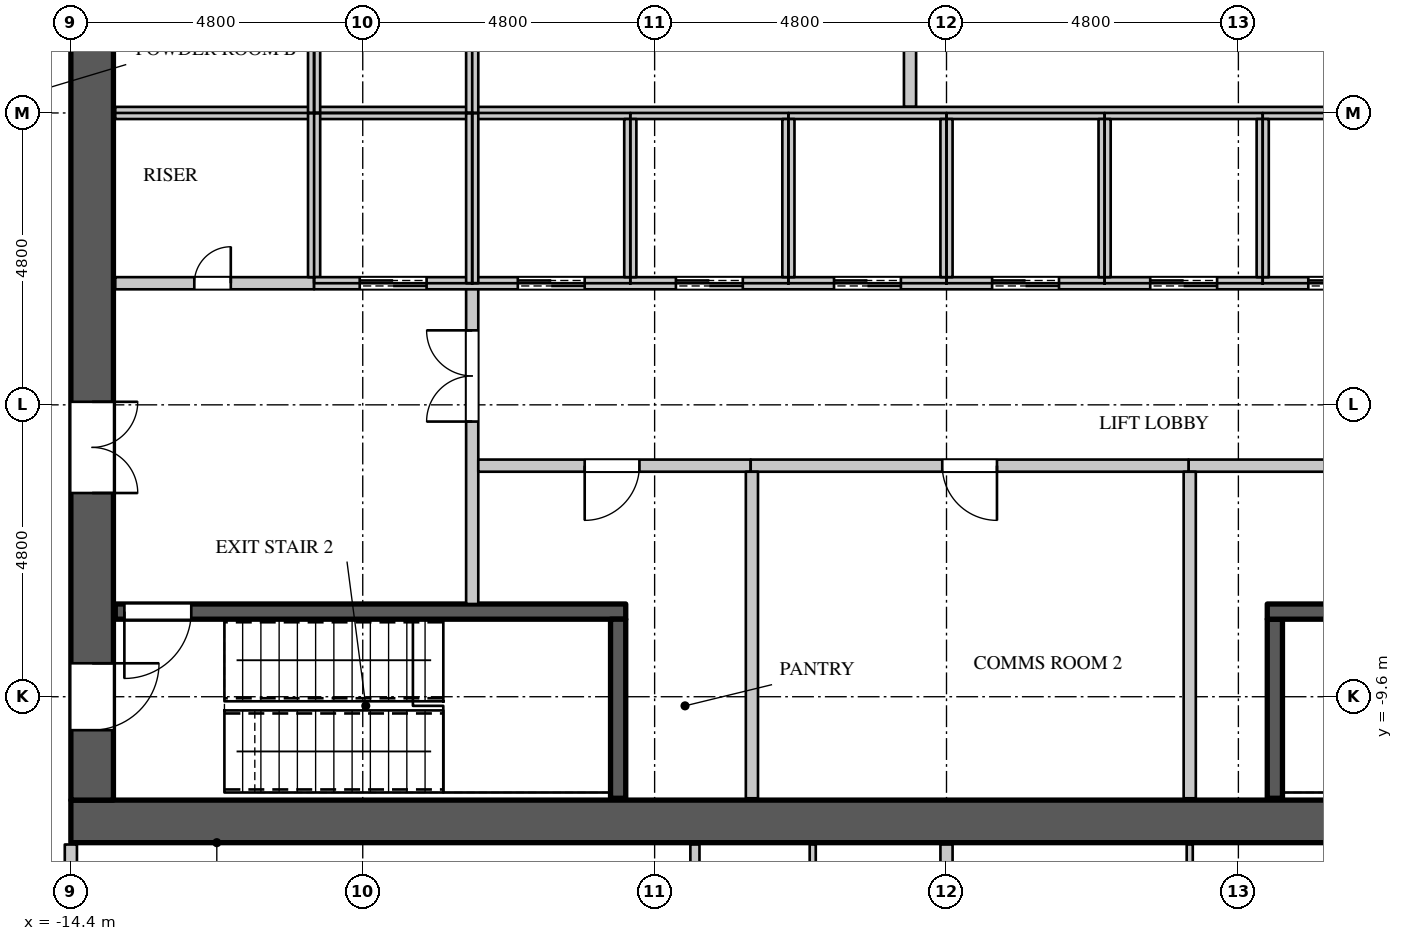
"""IFC4 building model, lengths in metres.
Left out: names, types, materials, properties, quantities, classifications, styles, units other than length and angle.
Written with IfcOpenShell. Run it as: python <this file> out.ifc"""

import sys

from ifc_helpers import new_model, si_unit, direction, frame, frame_2d, origin, place, context, subcontext, project, spatial, rectangle, extrude, element, fill, save


model = new_model("IFC4")
c1 = context("Model", 3, precision=1e-05, world=origin(), true_north=direction((0.0, 1.0)))
c2 = subcontext(c1, "Body", "Model", "MODEL_VIEW")
j1 = project(units=[si_unit("LENGTHUNIT", "METRE"), si_unit("PLANEANGLEUNIT", "RADIAN")], contexts=[c1])
p1 = place(None, origin())
s1 = spatial("IfcSite", under=j1, at=p1, CompositionType="ELEMENT")
p2 = place(p1, origin())
s2 = spatial("IfcBuilding", under=s1, at=p2, CompositionType="ELEMENT")
p3 = place(p2, frame((0.0, 0.0, 204.3)))
s3 = spatial("IfcBuildingStorey", under=s2, at=p3, CompositionType="ELEMENT", Elevation=204.3)
p4 = place(p3, frame((-14.4, -11.65, 0.0), z_axis=(0.0, 0.0, 1.0), x_axis=(1.0, 0.0, 0.0)))
e1 = element("IfcWall", 1, at=p4, inside=s3, PredefinedType="SHEAR", context=c2, shape_type="SweptSolid", body=[
    extrude(rectangle(XDim=28.8, YDim=0.7, at=frame_2d((14.4, 0.0))), origin(), (0.0, 0.0, 1.0), 4.2),
])
p5 = place(p3, frame((-14.05, -11.3, 0.0), z_axis=(0.0, 0.0, 1.0), x_axis=(0.0, 1.0, 0.0)))
e2 = element("IfcWall", 2, at=p5, inside=s3, PredefinedType="SHEAR", context=c2, shape_type="SweptSolid", body=[
    extrude(rectangle(XDim=22.6, YDim=0.7, at=frame_2d((11.3, 0.0))), origin(), (0.0, 0.0, 1.0), 4.2),
])
p6 = place(p5, frame((20.35, 0.0, 0.0)))
e3 = element("IfcOpeningElement", 3, at=p6, cuts=e2, PredefinedType="OPENING", context=c2, shape_type="SweptSolid", body=[
    extrude(rectangle(XDim=1.1, YDim=2.2, at=frame_2d((0.55, 1.1))), frame((0.0, 0.36, 0.0), z_axis=(0.0, -1.0, 0.0), x_axis=(1.0, 0.0, 0.0)), (0.0, 0.0, 1.0), 0.72),
])
p7 = place(p5, frame((1.15, 0.0, 0.0)))
e4 = element("IfcOpeningElement", 4, at=p7, cuts=e2, PredefinedType="OPENING", context=c2, shape_type="SweptSolid", body=[
    extrude(rectangle(XDim=1.1, YDim=2.2, at=frame_2d((0.55, 1.1))), frame((0.0, 0.36, 0.0), z_axis=(0.0, -1.0, 0.0), x_axis=(1.0, 0.0, 0.0)), (0.0, 0.0, 1.0), 0.72),
])
p8 = place(p5, frame((16.05, 0.0, 0.0)))
e5 = element("IfcOpeningElement", 5, at=p8, cuts=e2, PredefinedType="OPENING", context=c2, shape_type="SweptSolid", body=[
    extrude(rectangle(XDim=1.5, YDim=2.4, at=frame_2d((0.75, 1.2))), frame((0.0, 0.36, 0.0), z_axis=(0.0, -1.0, 0.0), x_axis=(1.0, 0.0, 0.0)), (0.0, 0.0, 1.0), 0.72),
])
p9 = place(p5, frame((5.05, 0.0, 0.0)))
e6 = element("IfcOpeningElement", 6, at=p9, cuts=e2, PredefinedType="OPENING", context=c2, shape_type="SweptSolid", body=[
    extrude(rectangle(XDim=1.5, YDim=2.4, at=frame_2d((0.75, 1.2))), frame((0.0, 0.36, 0.0), z_axis=(0.0, -1.0, 0.0), x_axis=(1.0, 0.0, 0.0)), (0.0, 0.0, 1.0), 0.72),
])
p10 = place(p3, frame((-14.4, -14.3, 0.0), z_axis=(0.0, 0.0, 1.0), x_axis=(0.0, 1.0, 0.0)))
e7 = element("IfcWall", 7, at=p10, inside=s3, PredefinedType="PARTITIONING", context=c2, shape_type="SweptSolid", body=[
    extrude(rectangle(XDim=2.27, YDim=0.2, at=frame_2d((1.135, 0.0))), origin(), (0.0, 0.0, 1.0), 3.798),
])
p11 = place(p3, frame((-7.8, -8.075, 0.0), z_axis=(0.0, 0.0, 1.0), x_axis=(0.0, 1.0, 0.0)))
e8 = element("IfcWall", 8, at=p11, inside=s3, PredefinedType="PARTITIONING", context=c2, shape_type="SweptSolid", body=[
    extrude(rectangle(XDim=5.275, YDim=0.2, at=frame_2d((2.637, 0.0))), origin(), (0.0, 0.0, 1.0), 3.798),
])
p12 = place(p11, frame((3.0, 0.0, 0.0)))
e9 = element("IfcOpeningElement", 9, at=p12, cuts=e8, PredefinedType="OPENING", context=c2, shape_type="SweptSolid", body=[
    extrude(rectangle(XDim=1.5, YDim=2.4, at=frame_2d((0.75, 1.2))), frame((0.0, 0.11, 0.0), z_axis=(0.0, -1.0, 0.0), x_axis=(1.0, 0.0, 0.0)), (0.0, 0.0, 1.0), 0.22),
])
p13 = place(p3, frame((-7.7, -5.8, 0.0), z_axis=(0.0, 0.0, 1.0), x_axis=(1.0, 0.0, 0.0)))
e10 = element("IfcWall", 10, at=p13, inside=s3, PredefinedType="PARTITIONING", context=c2, shape_type="SweptSolid", body=[
    extrude(rectangle(XDim=4.48, YDim=0.2, at=frame_2d((2.24, 0.0))), origin(), (0.0, 0.0, 1.0), 3.798),
])
p14 = place(p13, frame((1.75, 0.0, 0.0)))
e11 = element("IfcOpeningElement", 11, at=p14, cuts=e10, PredefinedType="OPENING", context=c2, shape_type="SweptSolid", body=[
    extrude(rectangle(XDim=0.9, YDim=2.2, at=frame_2d((0.45, 1.1))), frame((0.0, 0.11, 0.0), z_axis=(0.0, -1.0, 0.0), x_axis=(1.0, 0.0, 0.0)), (0.0, 0.0, 1.0), 0.22),
])
p15 = place(p3, frame((3.98, -5.8, 0.0), z_axis=(0.0, 0.0, 1.0), x_axis=(1.0, 0.0, 0.0)))
e12 = element("IfcWall", 12, at=p15, inside=s3, PredefinedType="PARTITIONING", context=c2, shape_type="SweptSolid", body=[
    extrude(rectangle(XDim=9.69, YDim=0.2, at=frame_2d((4.845, 0.0))), origin(), (0.0, 0.0, 1.0), 3.798),
])
p16 = place(p15, frame((4.4, 0.0, 0.0)))
e13 = element("IfcOpeningElement", 13, at=p16, cuts=e12, PredefinedType="OPENING", context=c2, shape_type="SweptSolid", body=[
    extrude(rectangle(XDim=0.9, YDim=2.2, at=frame_2d((0.45, 1.1))), frame((0.0, 0.11, 0.0), z_axis=(0.0, -1.0, 0.0), x_axis=(1.0, 0.0, 0.0)), (0.0, 0.0, 1.0), 0.22),
])
p17 = place(p3, frame((-4.137, -23.4, 0.0), z_axis=(0.0, 0.0, 1.0), x_axis=(0.0, 1.0, 0.0)))
e14 = element("IfcWall", 14, at=p17, inside=s3, PredefinedType="PARTITIONING", context=c2, shape_type="SweptSolid", body=[
    extrude(rectangle(XDim=11.37, YDim=0.15, at=frame_2d((5.685, 0.0))), origin(), (0.0, 0.0, 1.0), 3.2),
])
p18 = place(p17, frame((3.05, 0.0, 0.0)))
e15 = element("IfcOpeningElement", 15, at=p18, cuts=e14, PredefinedType="OPENING", context=c2, shape_type="SweptSolid", body=[
    extrude(rectangle(XDim=0.95, YDim=2.2, at=frame_2d((0.475, 1.1))), frame((0.0, 0.085, 0.0), z_axis=(0.0, -1.0, 0.0), x_axis=(1.0, 0.0, 0.0)), (0.0, 0.0, 1.0), 0.17),
])
p19 = place(p3, frame((0.0, -24.055, 0.0), z_axis=(0.0, 0.0, 1.0), x_axis=(0.0, 1.0, 0.0)))
e16 = element("IfcWall", 16, at=p19, inside=s3, PredefinedType="PARTITIONING", context=c2, shape_type="SweptSolid", body=[
    extrude(rectangle(XDim=12.025, YDim=0.2, at=frame_2d((6.012, 0.0))), origin(), (0.0, 0.0, 1.0), 3.798),
])
p20 = place(p3, frame((-13.67, -2.8, 0.0), z_axis=(0.0, 0.0, 1.0), x_axis=(1.0, 0.0, 0.0)))
e17 = element("IfcWall", 17, at=p20, inside=s3, PredefinedType="PARTITIONING", context=c2, shape_type="SweptSolid", body=[
    extrude(rectangle(XDim=3.27, YDim=0.2, at=frame_2d((1.635, 0.0))), origin(), (0.0, 0.0, 1.0), 3.798),
])
p21 = place(p20, frame((1.3, 0.0, 0.0)))
e18 = element("IfcOpeningElement", 18, at=p21, cuts=e17, PredefinedType="OPENING", context=c2, shape_type="SweptSolid", body=[
    extrude(rectangle(XDim=0.6, YDim=2.0, at=frame_2d((0.3, 1.0))), frame((0.0, 0.11, 0.0), z_axis=(0.0, -1.0, 0.0), x_axis=(1.0, 0.0, 0.0)), (0.0, 0.0, 1.0), 0.22),
])
p22 = place(p3, frame((-3.22, -5.8, 0.0), z_axis=(0.0, 0.0, 1.0), x_axis=(1.0, 0.0, 0.0)))
e19 = element("IfcWall", 19, at=p22, inside=s3, PredefinedType="PARTITIONING", context=c2, shape_type="SweptSolid", body=[
    extrude(rectangle(XDim=7.2, YDim=0.2, at=frame_2d((3.6, 0.0))), origin(), (0.0, 0.0, 1.0), 3.798),
])
p23 = place(p22, frame((3.15, 0.0, 0.0)))
e20 = element("IfcOpeningElement", 20, at=p23, cuts=e19, PredefinedType="OPENING", context=c2, shape_type="SweptSolid", body=[
    extrude(rectangle(XDim=0.9, YDim=2.2, at=frame_2d((0.45, 1.1))), frame((0.0, 0.11, 0.0), z_axis=(0.0, -1.0, 0.0), x_axis=(1.0, 0.0, 0.0)), (0.0, 0.0, 1.0), 0.22),
])
p24 = place(p3, frame((-3.2, -11.27, 0.0), z_axis=(0.0, 0.0, 1.0), x_axis=(0.0, 1.0, 0.0)))
e21 = element("IfcWall", 21, at=p24, inside=s3, PredefinedType="PARTITIONING", context=c2, shape_type="SweptSolid", body=[
    extrude(rectangle(XDim=5.37, YDim=0.2, at=frame_2d((2.685, 0.0))), origin(), (0.0, 0.0, 1.0), 3.798),
])
p25 = place(p3, frame((-0.6, 0.1, 0.0), z_axis=(0.0, 0.0, 1.0), x_axis=(0.0, 1.0, 0.0)))
e22 = element("IfcWall", 22, at=p25, inside=s3, PredefinedType="PARTITIONING", context=c2, shape_type="SweptSolid", body=[
    extrude(rectangle(XDim=2.6, YDim=0.2, at=frame_2d((1.3, 0.0))), origin(), (0.0, 0.0, 1.0), 3.798),
])
p26 = place(p3, frame((4.0, -11.27, 0.0), z_axis=(0.0, 0.0, 1.0), x_axis=(0.0, 1.0, 0.0)))
e23 = element("IfcWall", 23, at=p26, inside=s3, PredefinedType="PARTITIONING", context=c2, shape_type="SweptSolid", body=[
    extrude(rectangle(XDim=5.37, YDim=0.2, at=frame_2d((2.685, 0.0))), origin(), (0.0, 0.0, 1.0), 3.798),
])
p27 = place(p3, frame((-13.67, 0.0, 0.0), z_axis=(0.0, 0.0, 1.0), x_axis=(1.0, 0.0, 0.0)))
e24 = element("IfcWall", 24, at=p27, inside=s3, PredefinedType="PARTITIONING", context=c2, shape_type="SweptSolid", body=[
    extrude(rectangle(XDim=21.47, YDim=0.2, at=frame_2d((10.735, 0.0))), origin(), (0.0, 0.0, 1.0), 3.798),
])
p28 = place(p3, frame((-10.4, -2.7, 0.0), z_axis=(0.0, 0.0, 1.0), x_axis=(0.0, 1.0, 0.0)))
e25 = element("IfcWall", 25, at=p28, inside=s3, PredefinedType="PARTITIONING", context=c2, shape_type="SweptSolid", body=[
    extrude(rectangle(XDim=2.7, YDim=0.2, at=frame_2d((1.35, 0.0))), origin(), (0.0, 0.0, 1.0), 3.798),
])
p29 = place(p3, frame((-10.4, -2.8, 0.0), z_axis=(0.0, 0.0, 1.0), x_axis=(1.0, 0.0, 0.0)))
e26 = element("IfcWall", 26, at=p29, inside=s3, PredefinedType="PARTITIONING", context=c2, shape_type="SweptSolid", body=[
    extrude(rectangle(XDim=18.2, YDim=0.2, at=frame_2d((9.1, 0.0))), origin(), (0.0, 0.0, 1.0), 3.798),
])
p30 = place(p29, frame((0.75, 0.0, 0.0)))
e27 = element("IfcOpeningElement", 27, at=p30, cuts=e26, PredefinedType="OPENING", context=c2, shape_type="SweptSolid", body=[
    extrude(rectangle(XDim=1.1, YDim=2.2, at=frame_2d((0.55, 1.1))), frame((0.0, 0.11, 0.0), z_axis=(0.0, -1.0, 0.0), x_axis=(1.0, 0.0, 0.0)), (0.0, 0.0, 1.0), 0.22),
])
p31 = place(p29, frame((3.35, 0.0, 0.0)))
e28 = element("IfcOpeningElement", 28, at=p31, cuts=e26, PredefinedType="OPENING", context=c2, shape_type="SweptSolid", body=[
    extrude(rectangle(XDim=1.1, YDim=2.2, at=frame_2d((0.55, 1.1))), frame((0.0, 0.11, 0.0), z_axis=(0.0, -1.0, 0.0), x_axis=(1.0, 0.0, 0.0)), (0.0, 0.0, 1.0), 0.22),
])
p32 = place(p29, frame((5.95, 0.0, 0.0)))
e29 = element("IfcOpeningElement", 29, at=p32, cuts=e26, PredefinedType="OPENING", context=c2, shape_type="SweptSolid", body=[
    extrude(rectangle(XDim=1.1, YDim=2.2, at=frame_2d((0.55, 1.1))), frame((0.0, 0.11, 0.0), z_axis=(0.0, -1.0, 0.0), x_axis=(1.0, 0.0, 0.0)), (0.0, 0.0, 1.0), 0.22),
])
p33 = place(p29, frame((8.55, 0.0, 0.0)))
e30 = element("IfcOpeningElement", 30, at=p33, cuts=e26, PredefinedType="OPENING", context=c2, shape_type="SweptSolid", body=[
    extrude(rectangle(XDim=1.1, YDim=2.2, at=frame_2d((0.55, 1.1))), frame((0.0, 0.11, 0.0), z_axis=(0.0, -1.0, 0.0), x_axis=(1.0, 0.0, 0.0)), (0.0, 0.0, 1.0), 0.22),
])
p34 = place(p29, frame((11.15, 0.0, 0.0)))
e31 = element("IfcOpeningElement", 31, at=p34, cuts=e26, PredefinedType="OPENING", context=c2, shape_type="SweptSolid", body=[
    extrude(rectangle(XDim=1.1, YDim=2.2, at=frame_2d((0.55, 1.1))), frame((0.0, 0.11, 0.0), z_axis=(0.0, -1.0, 0.0), x_axis=(1.0, 0.0, 0.0)), (0.0, 0.0, 1.0), 0.22),
])
p35 = place(p29, frame((13.75, 0.0, 0.0)))
e32 = element("IfcOpeningElement", 32, at=p35, cuts=e26, PredefinedType="OPENING", context=c2, shape_type="SweptSolid", body=[
    extrude(rectangle(XDim=1.1, YDim=2.2, at=frame_2d((0.55, 1.1))), frame((0.0, 0.11, 0.0), z_axis=(0.0, -1.0, 0.0), x_axis=(1.0, 0.0, 0.0)), (0.0, 0.0, 1.0), 0.22),
])
p36 = place(p29, frame((16.35, 0.0, 0.0)))
e33 = element("IfcOpeningElement", 33, at=p36, cuts=e26, PredefinedType="OPENING", context=c2, shape_type="SweptSolid", body=[
    extrude(rectangle(XDim=1.1, YDim=2.2, at=frame_2d((0.55, 1.1))), frame((0.0, 0.11, 0.0), z_axis=(0.0, -1.0, 0.0), x_axis=(1.0, 0.0, 0.0)), (0.0, 0.0, 1.0), 0.22),
])
p37 = place(p3, frame((-10.4, 0.0, 0.0), z_axis=(0.0, 0.0, 1.0), x_axis=(0.0, 1.0, 0.0)))
e34 = element("IfcWall", 34, at=p37, inside=s3, PredefinedType="PARTITIONING", context=c2, shape_type="SweptSolid", body=[
    extrude(rectangle(XDim=2.7, YDim=0.2, at=frame_2d((1.35, 0.0))), origin(), (0.0, 0.0, 1.0), 3.798),
])
for number, where, z_axis, x_axis in (
    (35, (-7.8, -2.8, 0.0), (0.0, 0.0, 1.0), (0.0, 1.0, 0.0)),
    (36, (-7.8, 0.0, 0.0), (0.0, 0.0, 1.0), (0.0, 1.0, 0.0)),
):
    element("IfcWall", number, at=place(p3, frame(where, z_axis=z_axis, x_axis=x_axis)), inside=s3, PredefinedType="PARTITIONING", context=c2, shape_type="SweptSolid", body=[
        extrude(rectangle(XDim=2.8, YDim=0.2, at=frame_2d((1.4, 0.0))), origin(), (0.0, 0.0, 1.0), 3.798),
    ])
for number, where, z_axis, x_axis in (
    (37, (-5.2, -2.7, 0.0), (0.0, 0.0, 1.0), (0.0, 1.0, 0.0)),
    (38, (-2.6, -2.7, 0.0), (0.0, 0.0, 1.0), (0.0, 1.0, 0.0)),
    (39, (0.0, -2.7, 0.0), (0.0, 0.0, 1.0), (0.0, 1.0, 0.0)),
    (40, (2.6, -2.7, 0.0), (0.0, 0.0, 1.0), (0.0, 1.0, 0.0)),
    (41, (5.2, -2.7, 0.0), (0.0, 0.0, 1.0), (0.0, 1.0, 0.0)),
):
    element("IfcWall", number, at=place(p3, frame(where, z_axis=z_axis, x_axis=x_axis)), inside=s3, PredefinedType="PARTITIONING", context=c2, shape_type="SweptSolid", body=[
        extrude(rectangle(XDim=2.6, YDim=0.2, at=frame_2d((1.3, 0.0))), origin(), (0.0, 0.0, 1.0), 3.798),
    ])
p38 = place(p3, frame((-13.67, -8.2, 0.0), z_axis=(0.0, 0.0, 1.0), x_axis=(1.0, 0.0, 0.0)))
e42 = element("IfcWall", 42, at=p38, inside=s3, PredefinedType="SHEAR", context=c2, shape_type="SweptSolid", body=[
    extrude(rectangle(XDim=8.395, YDim=0.25, at=frame_2d((4.198, 0.0))), origin(), (0.0, 0.0, 1.0), 3.798),
])
p39 = place(p38, frame((0.15, 0.0, 0.0)))
e43 = element("IfcOpeningElement", 43, at=p39, cuts=e42, PredefinedType="OPENING", context=c2, shape_type="SweptSolid", body=[
    extrude(rectangle(XDim=1.1, YDim=2.2, at=frame_2d((0.55, 1.1))), frame((0.0, 0.135, 0.0), z_axis=(0.0, -1.0, 0.0), x_axis=(1.0, 0.0, 0.0)), (0.0, 0.0, 1.0), 0.27),
])
for number, where, z_axis, x_axis in (
    (44, (-5.4, -11.27, 0.0), (0.0, 0.0, 1.0), (0.0, 1.0, 0.0)),
    (45, (5.4, -11.27, 0.0), (0.0, 0.0, 1.0), (0.0, 1.0, 0.0)),
):
    element("IfcWall", number, at=place(p3, frame(where, z_axis=z_axis, x_axis=x_axis)), inside=s3, PredefinedType="SHEAR", context=c2, shape_type="SweptSolid", body=[
        extrude(rectangle(XDim=2.945, YDim=0.25, at=frame_2d((1.473, 0.0))), origin(), (0.0, 0.0, 1.0), 3.798),
    ])
p40 = place(p3, frame((5.275, -8.2, 0.0), z_axis=(0.0, 0.0, 1.0), x_axis=(1.0, 0.0, 0.0)))
e46 = element("IfcWall", 46, at=p40, inside=s3, PredefinedType="SHEAR", context=c2, shape_type="SweptSolid", body=[
    extrude(rectangle(XDim=8.395, YDim=0.25, at=frame_2d((4.198, 0.0))), origin(), (0.0, 0.0, 1.0), 3.798),
])
p41 = place(p3, frame((-2.2, -15.925, 0.0), z_axis=(0.0, 0.0, 1.0), x_axis=(0.0, 1.0, 0.0)))
e47 = element("IfcWall", 47, at=p41, inside=s3, PredefinedType="PARTITIONING", context=c2, shape_type="SweptSolid", body=[
    extrude(rectangle(XDim=3.895, YDim=0.1, at=frame_2d((1.948, 0.0))), origin(), (0.0, 0.0, 1.0), 3.798),
])
p42 = place(p3, frame((4.0, -16.95, 0.0), z_axis=(0.0, 0.0, 1.0), x_axis=(0.0, 1.0, 0.0)))
e48 = element("IfcWall", 48, at=p42, inside=s3, PredefinedType="PARTITIONING", context=c2, shape_type="SweptSolid", body=[
    extrude(rectangle(XDim=4.92, YDim=0.1, at=frame_2d((2.46, 0.0))), origin(), (0.0, 0.0, 1.0), 3.2),
])
p43 = place(p21, origin())
e49 = element("IfcDoor", 49, at=p43, inside=s3, OperationType="SINGLE_SWING_RIGHT", PredefinedType="DOOR", context=c2, shape_type="SweptSolid", body=[
    extrude(rectangle(XDim=0.6, YDim=2.0, at=frame_2d((0.3, 1.0))), frame((0.0, 0.025, 0.0), z_axis=(0.0, -1.0, 0.0), x_axis=(1.0, 0.0, 0.0)), (0.0, 0.0, 1.0), 0.05),
])
fill(e18, e49)
p44 = place(p14, origin())
e50 = element("IfcDoor", 50, at=p44, inside=s3, OperationType="SINGLE_SWING_RIGHT", PredefinedType="DOOR", context=c2, shape_type="SweptSolid", body=[
    extrude(rectangle(XDim=0.9, YDim=2.2, at=frame_2d((0.45, 1.1))), frame((0.0, 0.025, 0.0), z_axis=(0.0, -1.0, 0.0), x_axis=(1.0, 0.0, 0.0)), (0.0, 0.0, 1.0), 0.05),
])
fill(e11, e50)
p45 = place(p23, origin())
e51 = element("IfcDoor", 51, at=p45, inside=s3, OperationType="SINGLE_SWING_LEFT", PredefinedType="DOOR", context=c2, shape_type="SweptSolid", body=[
    extrude(rectangle(XDim=0.9, YDim=2.2, at=frame_2d((0.45, 1.1))), frame((0.0, 0.025, 0.0), z_axis=(0.0, -1.0, 0.0), x_axis=(1.0, 0.0, 0.0)), (0.0, 0.0, 1.0), 0.05),
])
fill(e20, e51)
p46 = place(p30, origin())
e52 = element("IfcDoor", 52, at=p46, inside=s3, OperationType="DOUBLE_DOOR_SLIDING", PredefinedType="DOOR", context=c2, shape_type="SweptSolid", body=[
    extrude(rectangle(XDim=1.1, YDim=2.2, at=frame_2d((0.55, 1.1))), frame((0.0, 0.025, 0.0), z_axis=(0.0, -1.0, 0.0), x_axis=(1.0, 0.0, 0.0)), (0.0, 0.0, 1.0), 0.05),
])
fill(e27, e52)
p47 = place(p31, origin())
e53 = element("IfcDoor", 53, at=p47, inside=s3, OperationType="DOUBLE_DOOR_SLIDING", PredefinedType="DOOR", context=c2, shape_type="SweptSolid", body=[
    extrude(rectangle(XDim=1.1, YDim=2.2, at=frame_2d((0.55, 1.1))), frame((0.0, 0.025, 0.0), z_axis=(0.0, -1.0, 0.0), x_axis=(1.0, 0.0, 0.0)), (0.0, 0.0, 1.0), 0.05),
])
fill(e28, e53)
p48 = place(p32, origin())
e54 = element("IfcDoor", 54, at=p48, inside=s3, OperationType="DOUBLE_DOOR_SLIDING", PredefinedType="DOOR", context=c2, shape_type="SweptSolid", body=[
    extrude(rectangle(XDim=1.1, YDim=2.2, at=frame_2d((0.55, 1.1))), frame((0.0, 0.025, 0.0), z_axis=(0.0, -1.0, 0.0), x_axis=(1.0, 0.0, 0.0)), (0.0, 0.0, 1.0), 0.05),
])
fill(e29, e54)
p49 = place(p33, origin())
e55 = element("IfcDoor", 55, at=p49, inside=s3, OperationType="DOUBLE_DOOR_SLIDING", PredefinedType="DOOR", context=c2, shape_type="SweptSolid", body=[
    extrude(rectangle(XDim=1.1, YDim=2.2, at=frame_2d((0.55, 1.1))), frame((0.0, 0.025, 0.0), z_axis=(0.0, -1.0, 0.0), x_axis=(1.0, 0.0, 0.0)), (0.0, 0.0, 1.0), 0.05),
])
fill(e30, e55)
p50 = place(p34, origin())
e56 = element("IfcDoor", 56, at=p50, inside=s3, OperationType="DOUBLE_DOOR_SLIDING", PredefinedType="DOOR", context=c2, shape_type="SweptSolid", body=[
    extrude(rectangle(XDim=1.1, YDim=2.2, at=frame_2d((0.55, 1.1))), frame((0.0, 0.025, 0.0), z_axis=(0.0, -1.0, 0.0), x_axis=(1.0, 0.0, 0.0)), (0.0, 0.0, 1.0), 0.05),
])
fill(e31, e56)
p51 = place(p35, origin())
e57 = element("IfcDoor", 57, at=p51, inside=s3, OperationType="DOUBLE_DOOR_SLIDING", PredefinedType="DOOR", context=c2, shape_type="SweptSolid", body=[
    extrude(rectangle(XDim=1.1, YDim=2.2, at=frame_2d((0.55, 1.1))), frame((0.0, 0.025, 0.0), z_axis=(0.0, -1.0, 0.0), x_axis=(1.0, 0.0, 0.0)), (0.0, 0.0, 1.0), 0.05),
])
fill(e32, e57)
p52 = place(p36, origin())
e58 = element("IfcDoor", 58, at=p52, inside=s3, OperationType="DOUBLE_DOOR_SLIDING", PredefinedType="DOOR", context=c2, shape_type="SweptSolid", body=[
    extrude(rectangle(XDim=1.1, YDim=2.2, at=frame_2d((0.55, 1.1))), frame((0.0, 0.025, 0.0), z_axis=(0.0, -1.0, 0.0), x_axis=(1.0, 0.0, 0.0)), (0.0, 0.0, 1.0), 0.05),
])
fill(e33, e58)
p53 = place(p39, origin())
e59 = element("IfcDoor", 59, at=p53, inside=s3, OperationType="SINGLE_SWING_RIGHT", PredefinedType="DOOR", context=c2, shape_type="SweptSolid", body=[
    extrude(rectangle(XDim=1.1, YDim=2.2, at=frame_2d((0.55, 1.1))), frame((0.0, 0.025, 0.0), z_axis=(0.0, -1.0, 0.0), x_axis=(1.0, 0.0, 0.0)), (0.0, 0.0, 1.0), 0.05),
])
fill(e43, e59)
p54 = place(p12, origin())
e60 = element("IfcDoor", 60, at=p54, inside=s3, OperationType="DOUBLE_DOOR_SINGLE_SWING", PredefinedType="DOOR", context=c2, shape_type="SweptSolid", body=[
    extrude(rectangle(XDim=1.5, YDim=2.4, at=frame_2d((0.75, 1.2))), frame((0.0, 0.025, 0.0), z_axis=(0.0, -1.0, 0.0), x_axis=(1.0, 0.0, 0.0)), (0.0, 0.0, 1.0), 0.05),
])
fill(e9, e60)
p55 = place(p7, origin())
e61 = element("IfcDoor", 61, at=p55, inside=s3, OperationType="SINGLE_SWING_LEFT", PredefinedType="DOOR", context=c2, shape_type="SweptSolid", body=[
    extrude(rectangle(XDim=1.1, YDim=2.2, at=frame_2d((0.55, 1.1))), frame((0.0, -0.295, 0.0), z_axis=(0.0, -1.0, 0.0), x_axis=(1.0, 0.0, 0.0)), (0.0, 0.0, 1.0), 0.05),
])
fill(e4, e61)
p56 = place(p9, origin())
e62 = element("IfcDoor", 62, at=p56, inside=s3, OperationType="DOUBLE_DOOR_SINGLE_SWING", PredefinedType="DOOR", context=c2, shape_type="SweptSolid", body=[
    extrude(rectangle(XDim=1.5, YDim=2.4, at=frame_2d((0.75, 1.2))), frame((0.0, -0.295, 0.0), z_axis=(0.0, -1.0, 0.0), x_axis=(1.0, 0.0, 0.0)), (0.0, 0.0, 1.0), 0.05),
])
fill(e6, e62)
save(model, sys.argv[1])
